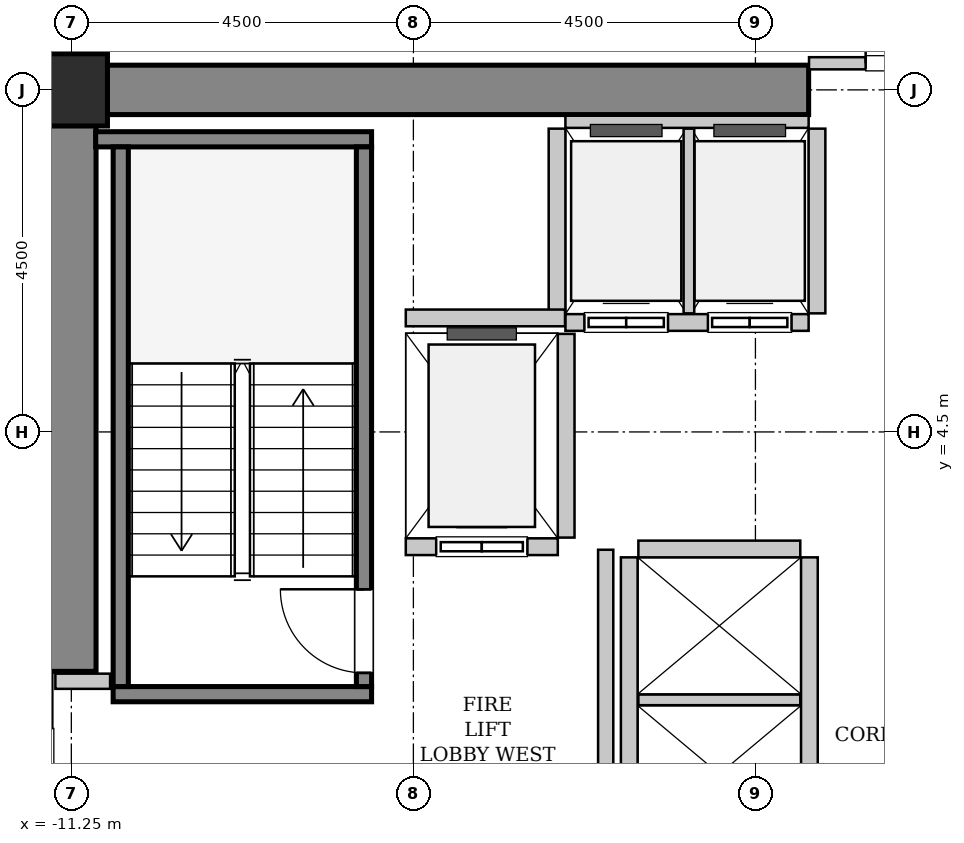
"""IFC4 building model, lengths in metres.
Left out: names, types, materials, properties, quantities, classifications, styles, units other than length and angle.
Written with IfcOpenShell. Run it as: python <this file> out.ifc"""

import sys

from ifc_helpers import new_model, si_unit, direction, frame, frame_2d, origin, origin_2d, place, context, subcontext, project, spatial, rectangle, hollow_rectangle, extrude, source, transform, mapped, element, fill, save


model = new_model("IFC4")
c1 = context("Model", 3, precision=1e-05, world=origin(), true_north=direction((0.0, 1.0)))
c2 = subcontext(c1, "Body", "Model", "MODEL_VIEW")
j1 = project(units=[si_unit("LENGTHUNIT", "METRE"), si_unit("PLANEANGLEUNIT", "RADIAN")], contexts=[c1])
p1 = place(None, origin())
s1 = spatial("IfcSite", under=j1, at=p1, CompositionType="ELEMENT")
p2 = place(p1, origin())
s2 = spatial("IfcBuilding", under=s1, at=p2, CompositionType="ELEMENT")
p3 = place(p2, frame((0.0, 0.0, 40.6)))
s3 = spatial("IfcBuildingStorey", under=s2, at=p3, CompositionType="ELEMENT", Elevation=40.6)
m1 = source(origin(), c2, "Body", "SweptSolid", [
    extrude(rectangle(XDim=10.025, YDim=0.65, at=frame_2d((5.012, 0.0))), origin(), (0.0, 0.0, 1.0), 3.8),
])
p4 = place(p3, frame((-11.575, 9.0, 0.0), z_axis=(0.0, 0.0, 1.0), x_axis=(1.0, 0.0, 0.0)))
e1 = element("IfcWall", 1, at=p4, inside=s3, PredefinedType="SHEAR", context=c2, shape_type="MappedRepresentation", body=[
    mapped(m1, transform((0.0, 0.0, 0.0), x_axis=(1.0, 0.0, 0.0), y_axis=(0.0, 1.0, 0.0), z_axis=(0.0, 0.0, 1.0), scale=1.0)),
])
m2 = source(origin(), c2, "Body", "SweptSolid", [
    extrude(rectangle(XDim=7.325, YDim=0.65, at=frame_2d((3.663, 0.0))), origin(), (0.0, 0.0, 1.0), 3.8),
])
p5 = place(p3, frame((-11.25, 1.35, 0.0), z_axis=(0.0, 0.0, 1.0), x_axis=(0.0, 1.0, 0.0)))
e2 = element("IfcWall", 2, at=p5, inside=s3, PredefinedType="SHEAR", context=c2, shape_type="MappedRepresentation", body=[
    mapped(m2, transform((0.0, 0.0, 0.0), x_axis=(1.0, 0.0, 0.0), y_axis=(0.0, 1.0, 0.0), z_axis=(0.0, 0.0, 1.0), scale=1.0)),
])
m3 = source(origin(), c2, "Body", "SweptSolid", [
    extrude(hollow_rectangle(XDim=0.95, YDim=0.95, WallThickness=0.045, InnerFilletRadius=0.045, OuterFilletRadius=0.09, at=origin_2d()), origin(), (0.0, 0.0, 1.0), 3.8),
])
p6 = place(p3, frame((-11.25, 9.0, 0.0), z_axis=(0.0, 0.0, 1.0), x_axis=(1.0, 0.0, 0.0)))
e3 = element("IfcColumn", 3, at=p6, inside=s3, PredefinedType="COLUMN", context=c2, shape_type="MappedRepresentation", body=[
    mapped(m3, transform((0.0, 0.0, 0.0), x_axis=(1.0, 0.0, 0.0), y_axis=(0.0, 1.0, 0.0), z_axis=(0.0, 0.0, 1.0), scale=1.0)),
])
m4 = source(origin(), c2, "Body", "SweptSolid", [
    extrude(rectangle(XDim=3.4, YDim=0.2, at=frame_2d((1.7, 0.0))), origin(), (0.0, 0.0, 1.0), 3.8),
])
p7 = place(p3, frame((-7.3, 1.05, 0.0), z_axis=(0.0, 0.0, 1.0), x_axis=(-1.0, 0.0, 0.0)))
e4 = element("IfcWall", 4, at=p7, inside=s3, PredefinedType="SOLIDWALL", context=c2, shape_type="MappedRepresentation", body=[
    mapped(m4, transform((0.0, 0.0, 0.0), x_axis=(1.0, 0.0, 0.0), y_axis=(0.0, 1.0, 0.0), z_axis=(0.0, 0.0, 1.0), scale=1.0)),
])
m5 = source(origin(), c2, "Body", "SweptSolid", [
    extrude(rectangle(XDim=3.63, YDim=0.2, at=frame_2d((1.815, 0.0))), origin(), (0.0, 0.0, 1.0), 3.8),
])
p8 = place(p3, frame((-7.3, 8.35, 0.0), z_axis=(0.0, 0.0, 1.0), x_axis=(-1.0, 0.0, 0.0)))
e5 = element("IfcWall", 5, at=p8, inside=s3, PredefinedType="SOLIDWALL", context=c2, shape_type="MappedRepresentation", body=[
    mapped(m5, transform((0.0, 0.0, 0.0), x_axis=(1.0, 0.0, 0.0), y_axis=(0.0, 1.0, 0.0), z_axis=(0.0, 0.0, 1.0), scale=1.0)),
])
m6 = source(origin(), c2, "Body", "SweptSolid", [
    extrude(rectangle(XDim=7.1, YDim=0.2, at=frame_2d((3.55, 0.0))), origin(), (0.0, 0.0, 1.0), 3.8),
])
p9 = place(p3, frame((-7.4, 1.15, 0.0), z_axis=(0.0, 0.0, 1.0), x_axis=(0.0, 1.0, 0.0)))
e6 = element("IfcWall", 6, at=p9, inside=s3, PredefinedType="SOLIDWALL", context=c2, shape_type="MappedRepresentation", body=[
    mapped(m6, transform((0.0, 0.0, 0.0), x_axis=(1.0, 0.0, 0.0), y_axis=(0.0, 1.0, 0.0), z_axis=(0.0, 0.0, 1.0), scale=1.0)),
])
p10 = place(p9, frame((0.18, 0.0, 0.0)))
e7 = element("IfcOpeningElement", 7, at=p10, cuts=e6, PredefinedType="OPENING", context=c2, shape_type="SweptSolid", body=[
    extrude(rectangle(XDim=1.1, YDim=2.15, at=frame_2d((0.55, 1.075))), frame((0.0, 0.11, 0.0), z_axis=(0.0, -1.0, 0.0), x_axis=(1.0, 0.0, 0.0)), (0.0, 0.0, 1.0), 0.22),
])
p11 = place(p3, frame((-10.6, 1.15, 0.0), z_axis=(0.0, 0.0, 1.0), x_axis=(0.0, 1.0, 0.0)))
e8 = element("IfcWall", 8, at=p11, inside=s3, PredefinedType="SOLIDWALL", context=c2, shape_type="MappedRepresentation", body=[
    mapped(m6, transform((0.0, 0.0, 0.0), x_axis=(1.0, 0.0, 0.0), y_axis=(0.0, 1.0, 0.0), z_axis=(0.0, 0.0, 1.0), scale=1.0)),
])
m7 = source(origin(), c2, "Body", "SweptSolid", [
    extrude(rectangle(XDim=2.0, YDim=0.22, at=frame_2d((1.0, 0.0))), origin(), (0.0, 0.0, 1.0), 3.535),
])
p12 = place(p3, frame((-6.85, 2.99, 0.0), z_axis=(0.0, 0.0, 1.0), x_axis=(1.0, 0.0, 0.0)))
e9 = element("IfcWall", 9, at=p12, inside=s3, PredefinedType="SOLIDWALL", context=c2, shape_type="MappedRepresentation", body=[
    mapped(m7, transform((0.0, 0.0, 0.0), x_axis=(1.0, 0.0, 0.0), y_axis=(0.0, 1.0, 0.0), z_axis=(0.0, 0.0, 1.0), scale=1.0)),
])
p13 = place(p12, frame((0.4, 0.0, 0.0)))
e10 = element("IfcOpeningElement", 10, at=p13, cuts=e9, PredefinedType="OPENING", context=c2, shape_type="SweptSolid", body=[
    extrude(rectangle(XDim=1.2, YDim=2.2, at=frame_2d((0.6, 1.1))), frame((0.0, 0.12, 0.0), z_axis=(0.0, -1.0, 0.0), x_axis=(1.0, 0.0, 0.0)), (0.0, 0.0, 1.0), 0.24),
])
m8 = source(origin(), c2, "Body", "SweptSolid", [
    extrude(rectangle(XDim=2.68, YDim=0.22, at=frame_2d((1.34, 0.0))), origin(), (0.0, 0.0, 1.0), 3.535),
])
p14 = place(p3, frame((-4.74, 3.11, 0.0), z_axis=(0.0, 0.0, 1.0), x_axis=(0.0, 1.0, 0.0)))
e11 = element("IfcWall", 11, at=p14, inside=s3, PredefinedType="SOLIDWALL", context=c2, shape_type="MappedRepresentation", body=[
    mapped(m8, transform((0.0, 0.0, 0.0), x_axis=(1.0, 0.0, 0.0), y_axis=(0.0, 1.0, 0.0), z_axis=(0.0, 0.0, 1.0), scale=1.0)),
])
m9 = source(origin(), c2, "Body", "SweptSolid", [
    extrude(rectangle(XDim=3.2, YDim=0.22, at=frame_2d((1.6, 0.0))), origin(), (0.0, 0.0, 1.0), 3.535),
])
p15 = place(p3, frame((-4.75, 5.94, 0.0), z_axis=(0.0, 0.0, 1.0), x_axis=(1.0, 0.0, 0.0)))
e12 = element("IfcWall", 12, at=p15, inside=s3, PredefinedType="SOLIDWALL", context=c2, shape_type="MappedRepresentation", body=[
    mapped(m9, transform((0.0, 0.0, 0.0), x_axis=(1.0, 0.0, 0.0), y_axis=(0.0, 1.0, 0.0), z_axis=(0.0, 0.0, 1.0), scale=1.0)),
])
p16 = place(p15, frame((0.25, 0.0, 0.0)))
e13 = element("IfcOpeningElement", 13, at=p16, cuts=e12, PredefinedType="OPENING", context=c2, shape_type="SweptSolid", body=[
    extrude(rectangle(XDim=1.1, YDim=2.2, at=frame_2d((0.55, 1.1))), frame((0.0, 0.12, 0.0), z_axis=(0.0, -1.0, 0.0), x_axis=(1.0, 0.0, 0.0)), (0.0, 0.0, 1.0), 0.24),
])
p17 = place(p15, frame((1.875, 0.0, 0.0)))
e14 = element("IfcOpeningElement", 14, at=p17, cuts=e12, PredefinedType="OPENING", context=c2, shape_type="SweptSolid", body=[
    extrude(rectangle(XDim=1.1, YDim=2.2, at=frame_2d((0.55, 1.1))), frame((0.0, 0.12, 0.0), z_axis=(0.0, -1.0, 0.0), x_axis=(1.0, 0.0, 0.0)), (0.0, 0.0, 1.0), 0.24),
])
m10 = source(origin(), c2, "Body", "SweptSolid", [
    extrude(rectangle(XDim=3.2, YDim=0.16, at=frame_2d((1.6, 0.0))), origin(), (0.0, 0.0, 1.0), 2.425),
])
p18 = place(p3, frame((-1.55, 8.58, 0.0), z_axis=(0.0, 0.0, 1.0), x_axis=(-1.0, 0.0, 0.0)))
e15 = element("IfcWall", 15, at=p18, inside=s3, PredefinedType="PARTITIONING", context=c2, shape_type="MappedRepresentation", body=[
    mapped(m10, transform((0.0, 0.0, 0.0), x_axis=(1.0, 0.0, 0.0), y_axis=(0.0, 1.0, 0.0), z_axis=(0.0, 0.0, 1.0), scale=1.0)),
])
m11 = source(origin(), c2, "Body", "SweptSolid", [
    extrude(rectangle(XDim=2.43, YDim=0.22, at=frame_2d((1.215, 0.0))), origin(), (0.0, 0.0, 1.0), 3.535),
])
p19 = place(p3, frame((-4.86, 8.49, 0.0), z_axis=(0.0, 0.0, 1.0), x_axis=(0.0, -1.0, 0.0)))
e16 = element("IfcWall", 16, at=p19, inside=s3, PredefinedType="SOLIDWALL", context=c2, shape_type="MappedRepresentation", body=[
    mapped(m11, transform((0.0, 0.0, 0.0), x_axis=(1.0, 0.0, 0.0), y_axis=(0.0, 1.0, 0.0), z_axis=(0.0, 0.0, 1.0), scale=1.0)),
])
m12 = source(origin(), c2, "Body", "SweptSolid", [
    extrude(rectangle(XDim=2.43, YDim=0.14, at=frame_2d((1.215, 0.0))), origin(), (0.0, 0.0, 1.0), 3.535),
])
p20 = place(p3, frame((-3.125, 6.06, 0.0), z_axis=(0.0, 0.0, 1.0), x_axis=(0.0, 1.0, 0.0)))
e17 = element("IfcWall", 17, at=p20, inside=s3, PredefinedType="PARTITIONING", context=c2, shape_type="MappedRepresentation", body=[
    mapped(m12, transform((0.0, 0.0, 0.0), x_axis=(1.0, 0.0, 0.0), y_axis=(0.0, 1.0, 0.0), z_axis=(0.0, 0.0, 1.0), scale=1.0)),
])
p21 = place(p3, frame((-1.44, 6.06, 0.0), z_axis=(0.0, 0.0, 1.0), x_axis=(0.0, 1.0, 0.0)))
e18 = element("IfcWall", 18, at=p21, inside=s3, PredefinedType="SOLIDWALL", context=c2, shape_type="MappedRepresentation", body=[
    mapped(m11, transform((0.0, 0.0, 0.0), x_axis=(1.0, 0.0, 0.0), y_axis=(0.0, 1.0, 0.0), z_axis=(0.0, 0.0, 1.0), scale=1.0)),
])
m13 = source(origin(), c2, "Body", "SweptSolid", [
    extrude(rectangle(XDim=5.7, YDim=0.22, at=frame_2d((2.85, 0.0))), origin(), (0.0, 0.0, 1.0), 3.535),
])
for number, where, z_axis, x_axis in (
    (19, (-1.54, -2.85, 0.0), (0.0, 0.0, 1.0), (0.0, 1.0, 0.0)),
    (20, (-3.91, 2.85, 0.0), (0.0, 0.0, 1.0), (0.0, -1.0, 0.0)),
):
    element("IfcWall", number, at=place(p3, frame(where, z_axis=z_axis, x_axis=x_axis)), inside=s3, PredefinedType="SOLIDWALL", context=c2, shape_type="MappedRepresentation", body=[
        mapped(m13, transform((0.0, 0.0, 0.0), x_axis=(1.0, 0.0, 0.0), y_axis=(0.0, 1.0, 0.0), z_axis=(0.0, 0.0, 1.0), scale=1.0)),
    ])
m14 = source(origin(), c2, "Body", "SweptSolid", [
    extrude(rectangle(XDim=2.13, YDim=0.14, at=frame_2d((1.065, 0.0))), origin(), (0.0, 0.0, 1.0), 3.535),
])
p22 = place(p3, frame((-3.79, 0.975, 0.0), z_axis=(0.0, 0.0, 1.0), x_axis=(1.0, 0.0, 0.0)))
e21 = element("IfcWall", 21, at=p22, inside=s3, PredefinedType="PARTITIONING", context=c2, shape_type="MappedRepresentation", body=[
    mapped(m14, transform((0.0, 0.0, 0.0), x_axis=(1.0, 0.0, 0.0), y_axis=(0.0, 1.0, 0.0), z_axis=(0.0, 0.0, 1.0), scale=1.0)),
])
m15 = source(origin(), c2, "Body", "SweptSolid", [
    extrude(rectangle(XDim=2.13, YDim=0.22, at=frame_2d((1.065, 0.0))), origin(), (0.0, 0.0, 1.0), 3.535),
])
p23 = place(p3, frame((-1.66, 2.96, 0.0), z_axis=(0.0, 0.0, 1.0), x_axis=(-1.0, 0.0, 0.0)))
e22 = element("IfcWall", 22, at=p23, inside=s3, PredefinedType="SOLIDWALL", context=c2, shape_type="MappedRepresentation", body=[
    mapped(m15, transform((0.0, 0.0, 0.0), x_axis=(1.0, 0.0, 0.0), y_axis=(0.0, 1.0, 0.0), z_axis=(0.0, 0.0, 1.0), scale=1.0)),
])
m16 = source(origin(), c2, "Body", "SweptSolid", [
    extrude(rectangle(XDim=2.095, YDim=0.22, at=frame_2d((1.048, 0.0))), origin(), (0.0, 0.0, 1.0), 3.535),
])
p24 = place(p3, frame((-6.85, 6.0, 0.0), z_axis=(0.0, 0.0, 1.0), x_axis=(1.0, 0.0, 0.0)))
e23 = element("IfcWall", 23, at=p24, inside=s3, PredefinedType="SOLIDWALL", context=c2, shape_type="MappedRepresentation", body=[
    mapped(m16, transform((0.0, 0.0, 0.0), x_axis=(1.0, 0.0, 0.0), y_axis=(0.0, 1.0, 0.0), z_axis=(0.0, 0.0, 1.0), scale=1.0)),
])
m17 = source(origin(), c2, "Body", "SweptSolid", [
    extrude(rectangle(XDim=5.9, YDim=0.2, at=frame_2d((2.95, 0.0))), origin(), (0.0, 0.0, 1.0), 3.535),
])
p25 = place(p3, frame((-4.22, -2.95, 0.0), z_axis=(0.0, 0.0, 1.0), x_axis=(0.0, 1.0, 0.0)))
e24 = element("IfcWall", 24, at=p25, inside=s3, PredefinedType="PARTITIONING", context=c2, shape_type="MappedRepresentation", body=[
    mapped(m17, transform((0.0, 0.0, 0.0), x_axis=(1.0, 0.0, 0.0), y_axis=(0.0, 1.0, 0.0), z_axis=(0.0, 0.0, 1.0), scale=1.0)),
])
m18 = source(origin(), c2, "Body", "SweptSolid", [
    extrude(rectangle(XDim=0.72, YDim=0.2, at=frame_2d((0.36, 0.0))), origin(), (0.0, 0.0, 1.0), 3.535),
])
p26 = place(p3, frame((-11.46, 1.22, 0.0), z_axis=(0.0, 0.0, 1.0), x_axis=(1.0, 0.0, 0.0)))
e25 = element("IfcWall", 25, at=p26, inside=s3, PredefinedType="PARTITIONING", context=c2, shape_type="MappedRepresentation", body=[
    mapped(m18, transform((0.0, 0.0, 0.0), x_axis=(1.0, 0.0, 0.0), y_axis=(0.0, 1.0, 0.0), z_axis=(0.0, 0.0, 1.0), scale=1.0)),
])
m19 = source(origin(), c2, "Body", "SweptSolid", [
    extrude(rectangle(XDim=3.09, YDim=0.16, at=frame_2d((1.545, 0.0))), origin(), (0.0, 0.0, 1.0), 2.425),
])
p27 = place(p3, frame((-1.545, 9.35, 0.0), z_axis=(0.0, 0.0, 1.0), x_axis=(1.0, 0.0, 0.0)))
e26 = element("IfcWall", 26, at=p27, inside=s3, PredefinedType="PARTITIONING", context=c2, shape_type="MappedRepresentation", body=[
    mapped(m19, transform((0.0, 0.0, 0.0), x_axis=(1.0, 0.0, 0.0), y_axis=(0.0, 1.0, 0.0), z_axis=(0.0, 0.0, 1.0), scale=1.0)),
])
p28 = place(p27, frame((0.745, 0.0, 0.0)))
e27 = element("IfcOpeningElement", 27, at=p28, cuts=e26, PredefinedType="OPENING", context=c2, shape_type="SweptSolid", body=[
    extrude(rectangle(XDim=1.6, YDim=2.3, at=frame_2d((0.8, 1.15))), frame((0.0, 0.09, 0.0), z_axis=(0.0, -1.0, 0.0), x_axis=(1.0, 0.0, 0.0)), (0.0, 0.0, 1.0), 0.18),
])
m20 = source(origin(), c2, "Body", "SweptSolid", [
    extrude(rectangle(XDim=1.1, YDim=2.15, at=frame_2d((0.55, 1.075))), frame((0.0, 0.025, 0.0), z_axis=(0.0, -1.0, 0.0), x_axis=(1.0, 0.0, 0.0)), (0.0, 0.0, 1.0), 0.05),
])
p29 = place(p10, origin())
e28 = element("IfcDoor", 28, at=p29, inside=s3, OperationType="SINGLE_SWING_RIGHT", PredefinedType="DOOR", context=c2, shape_type="MappedRepresentation", body=[
    mapped(m20, transform((0.0, 0.0, 0.0), x_axis=(1.0, 0.0, 0.0), y_axis=(0.0, 1.0, 0.0), z_axis=(0.0, 0.0, 1.0), scale=1.0)),
])
fill(e7, e28)
m21 = source(origin(), c2, "Body", "SweptSolid", [
    extrude(rectangle(XDim=1.2, YDim=2.2, at=frame_2d((0.6, 1.1))), frame((0.0, 0.025, 0.0), z_axis=(0.0, -1.0, 0.0), x_axis=(1.0, 0.0, 0.0)), (0.0, 0.0, 1.0), 0.05),
])
p30 = place(p13, origin())
e29 = element("IfcDoor", 29, at=p30, inside=s3, OperationType="SLIDING_TO_LEFT", PredefinedType="DOOR", context=c2, shape_type="MappedRepresentation", body=[
    mapped(m21, transform((0.0, 0.0, 0.0), x_axis=(1.0, 0.0, 0.0), y_axis=(0.0, 1.0, 0.0), z_axis=(0.0, 0.0, 1.0), scale=1.0)),
])
fill(e10, e29)
m22 = source(origin(), c2, "Body", "SweptSolid", [
    extrude(rectangle(XDim=1.1, YDim=2.2, at=frame_2d((0.55, 1.1))), frame((0.0, 0.025, 0.0), z_axis=(0.0, -1.0, 0.0), x_axis=(1.0, 0.0, 0.0)), (0.0, 0.0, 1.0), 0.05),
])
p31 = place(p16, origin())
e30 = element("IfcDoor", 30, at=p31, inside=s3, OperationType="DOUBLE_DOOR_SLIDING", PredefinedType="DOOR", context=c2, shape_type="MappedRepresentation", body=[
    mapped(m22, transform((0.0, 0.0, 0.0), x_axis=(1.0, 0.0, 0.0), y_axis=(0.0, 1.0, 0.0), z_axis=(0.0, 0.0, 1.0), scale=1.0)),
])
fill(e13, e30)
p32 = place(p17, origin())
e31 = element("IfcDoor", 31, at=p32, inside=s3, OperationType="DOUBLE_DOOR_SLIDING", PredefinedType="DOOR", context=c2, shape_type="MappedRepresentation", body=[
    mapped(m22, transform((0.0, 0.0, 0.0), x_axis=(1.0, 0.0, 0.0), y_axis=(0.0, 1.0, 0.0), z_axis=(0.0, 0.0, 1.0), scale=1.0)),
])
fill(e14, e31)
m23 = source(origin(), c2, "Body", "SweptSolid", [
    extrude(rectangle(XDim=1.6, YDim=2.3, at=frame_2d((0.8, 1.15))), frame((0.0, 0.025, 0.0), z_axis=(0.0, -1.0, 0.0), x_axis=(1.0, 0.0, 0.0)), (0.0, 0.0, 1.0), 0.05),
])
p33 = place(p28, origin())
e32 = element("IfcDoor", 32, at=p33, inside=s3, OperationType="DOUBLE_DOOR_SINGLE_SWING", PredefinedType="DOOR", context=c2, shape_type="MappedRepresentation", body=[
    mapped(m23, transform((0.0, 0.0, 0.0), x_axis=(1.0, 0.0, 0.0), y_axis=(0.0, 1.0, 0.0), z_axis=(0.0, 0.0, 1.0), scale=1.0)),
])
fill(e27, e32)
save(model, sys.argv[1])
